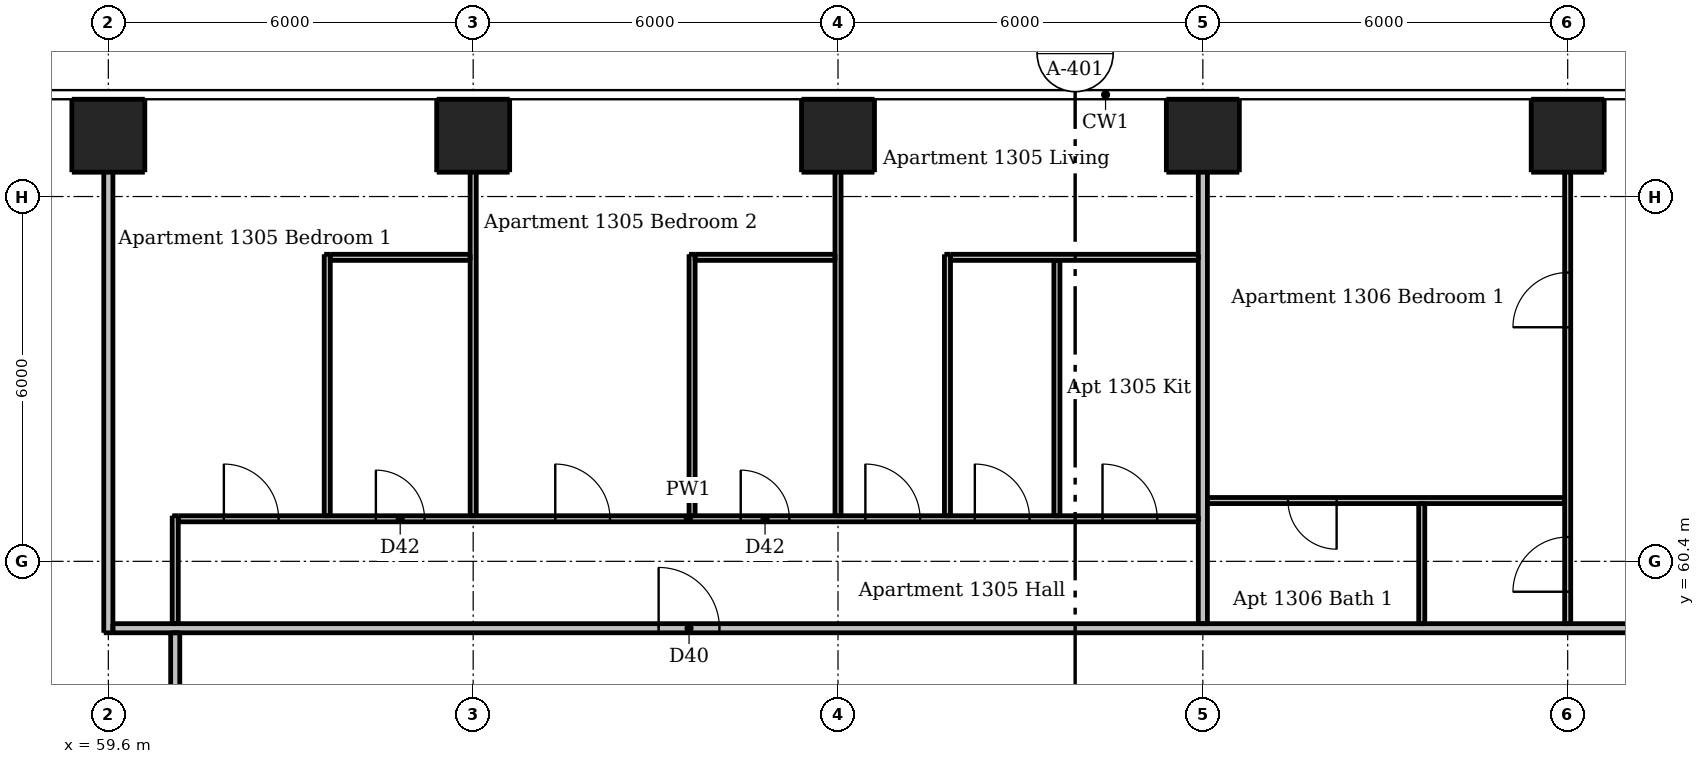
"""IFC4 building model, lengths in metres.
Left out: names, types, materials, properties, quantities, classifications, styles, units other than length and angle.
Written with IfcOpenShell. Run it as: python <this file> out.ifc"""

import sys

from ifc_helpers import new_model, si_unit, direction, frame, frame_2d, origin, origin_2d, place, context, subcontext, project, spatial, rectangle, extrude, element, fill, save


model = new_model("IFC4")
c1 = context("Model", 3, precision=1e-05, world=origin(), true_north=direction((0.0, 1.0)))
c2 = subcontext(c1, "Body", "Model", "MODEL_VIEW")
j1 = project(units=[si_unit("LENGTHUNIT", "METRE"), si_unit("PLANEANGLEUNIT", "RADIAN")], contexts=[c1])
p1 = place(None, origin())
s1 = spatial("IfcSite", under=j1, at=p1, CompositionType="ELEMENT")
p2 = place(p1, origin())
s2 = spatial("IfcBuilding", under=s1, at=p2, CompositionType="ELEMENT")
p3 = place(p2, frame((0.0, 0.0, 49.9)))
s3 = spatial("IfcBuildingStorey", under=s2, at=p3, CompositionType="ELEMENT", Elevation=49.9)
for number, where, z_axis, x_axis in (
    (1, (59.6, 67.4, 0.0), (0.0, 0.0, 1.0), (1.0, 0.0, 0.0)),
    (2, (65.6, 67.4, 0.0), (0.0, 0.0, 1.0), (1.0, 0.0, 0.0)),
    (3, (71.6, 67.4, 0.0), (0.0, 0.0, 1.0), (1.0, 0.0, 0.0)),
    (4, (77.6, 67.4, 0.0), (0.0, 0.0, 1.0), (1.0, 0.0, 0.0)),
    (5, (83.6, 67.4, 0.0), (0.0, 0.0, 1.0), (1.0, 0.0, 0.0)),
):
    element("IfcColumn", number, at=place(p3, frame(where, z_axis=z_axis, x_axis=x_axis)), inside=s3, PredefinedType="COLUMN", context=c2, shape_type="SweptSolid", body=[
        extrude(rectangle(XDim=1.2, YDim=1.2, at=origin_2d()), origin(), (0.0, 0.0, 1.0), 3.05),
    ])
p4 = place(p3, frame((60.7, 59.375, 0.0), z_axis=(0.0, 0.0, 1.0), x_axis=(0.0, 1.0, 0.0)))
e6 = element("IfcWall", 6, at=p4, inside=s3, PredefinedType="PARTITIONING", context=c2, shape_type="SweptSolid", body=[
    extrude(rectangle(XDim=1.775, YDim=0.1, at=frame_2d((0.887, 0.0))), origin(), (0.0, 0.0, 1.0), 3.05),
])
p5 = place(p3, frame((63.2, 61.15, 0.0), z_axis=(0.0, 0.0, 1.0), x_axis=(0.0, 1.0, 0.0)))
e7 = element("IfcWall", 7, at=p5, inside=s3, PredefinedType="PARTITIONING", context=c2, shape_type="SweptSolid", body=[
    extrude(rectangle(XDim=4.3, YDim=0.1, at=frame_2d((2.15, 0.0))), origin(), (0.0, 0.0, 1.0), 3.05),
])
p6 = place(p3, frame((65.6, 61.15, 0.0), z_axis=(0.0, 0.0, 1.0), x_axis=(0.0, 1.0, 0.0)))
e8 = element("IfcWall", 8, at=p6, inside=s3, PredefinedType="PARTITIONING", context=c2, shape_type="SweptSolid", body=[
    extrude(rectangle(XDim=6.85, YDim=0.1, at=frame_2d((3.425, 0.0))), origin(), (0.0, 0.0, 1.0), 2.516),
])
p7 = place(p3, frame((69.2, 61.15, 0.0), z_axis=(0.0, 0.0, 1.0), x_axis=(0.0, 1.0, 0.0)))
e9 = element("IfcWall", 9, at=p7, inside=s3, PredefinedType="PARTITIONING", context=c2, shape_type="SweptSolid", body=[
    extrude(rectangle(XDim=4.3, YDim=0.1, at=frame_2d((2.15, 0.0))), origin(), (0.0, 0.0, 1.0), 3.05),
])
p8 = place(p3, frame((71.6, 61.15, 0.0), z_axis=(0.0, 0.0, 1.0), x_axis=(0.0, 1.0, 0.0)))
e10 = element("IfcWall", 10, at=p8, inside=s3, PredefinedType="PARTITIONING", context=c2, shape_type="SweptSolid", body=[
    extrude(rectangle(XDim=6.85, YDim=0.1, at=frame_2d((3.425, 0.0))), origin(), (0.0, 0.0, 1.0), 2.516),
])
p9 = place(p3, frame((73.4, 61.15, 0.0), z_axis=(0.0, 0.0, 1.0), x_axis=(0.0, 1.0, 0.0)))
e11 = element("IfcWall", 11, at=p9, inside=s3, PredefinedType="PARTITIONING", context=c2, shape_type="SweptSolid", body=[
    extrude(rectangle(XDim=4.3, YDim=0.1, at=frame_2d((2.15, 0.0))), origin(), (0.0, 0.0, 1.0), 3.05),
])
p10 = place(p3, frame((75.2, 61.15, 0.0), z_axis=(0.0, 0.0, 1.0), x_axis=(0.0, 1.0, 0.0)))
e12 = element("IfcWall", 12, at=p10, inside=s3, PredefinedType="PARTITIONING", context=c2, shape_type="SweptSolid", body=[
    extrude(rectangle(XDim=4.2, YDim=0.1, at=frame_2d((2.1, 0.0))), origin(), (0.0, 0.0, 1.0), 3.05),
])
p11 = place(p3, frame((81.2, 59.375, 0.0), z_axis=(0.0, 0.0, 1.0), x_axis=(0.0, 1.0, 0.0)))
e13 = element("IfcWall", 13, at=p11, inside=s3, PredefinedType="PARTITIONING", context=c2, shape_type="SweptSolid", body=[
    extrude(rectangle(XDim=1.975, YDim=0.1, at=frame_2d((0.988, 0.0))), origin(), (0.0, 0.0, 1.0), 3.05),
])
p12 = place(p3, frame((83.6, 59.375, 0.0), z_axis=(0.0, 0.0, 1.0), x_axis=(0.0, 1.0, 0.0)))
e14 = element("IfcWall", 14, at=p12, inside=s3, PredefinedType="PARTITIONING", context=c2, shape_type="SweptSolid", body=[
    extrude(rectangle(XDim=8.625, YDim=0.1, at=frame_2d((4.312, 0.0))), origin(), (0.0, 0.0, 1.0), 2.516),
])
p13 = place(p12, frame((0.525, 0.0, 0.0)))
e15 = element("IfcOpeningElement", 15, at=p13, cuts=e14, PredefinedType="OPENING", context=c2, shape_type="SweptSolid", body=[
    extrude(rectangle(XDim=0.9, YDim=2.1, at=frame_2d((0.45, 1.05))), frame((0.0, 0.06, 0.0), z_axis=(0.0, -1.0, 0.0), x_axis=(1.0, 0.0, 0.0)), (0.0, 0.0, 1.0), 0.12),
])
p14 = place(p12, frame((4.875, 0.0, 0.0)))
e16 = element("IfcOpeningElement", 16, at=p14, cuts=e14, PredefinedType="OPENING", context=c2, shape_type="SweptSolid", body=[
    extrude(rectangle(XDim=0.9, YDim=2.1, at=frame_2d((0.45, 1.05))), frame((0.0, 0.06, 0.0), z_axis=(0.0, -1.0, 0.0), x_axis=(1.0, 0.0, 0.0)), (0.0, 0.0, 1.0), 0.12),
])
for number, where, z_axis, x_axis in (
    (17, (63.25, 65.4, 0.0), (0.0, 0.0, 1.0), (1.0, 0.0, 0.0)),
    (18, (69.25, 65.4, 0.0), (0.0, 0.0, 1.0), (1.0, 0.0, 0.0)),
):
    element("IfcWall", number, at=place(p3, frame(where, z_axis=z_axis, x_axis=x_axis)), inside=s3, PredefinedType="PARTITIONING", context=c2, shape_type="SweptSolid", body=[
        extrude(rectangle(XDim=2.3, YDim=0.1, at=frame_2d((1.15, 0.0))), origin(), (0.0, 0.0, 1.0), 3.05),
    ])
p15 = place(p3, frame((73.45, 65.4, 0.0), z_axis=(0.0, 0.0, 1.0), x_axis=(1.0, 0.0, 0.0)))
e19 = element("IfcWall", 19, at=p15, inside=s3, PredefinedType="PARTITIONING", context=c2, shape_type="SweptSolid", body=[
    extrude(rectangle(XDim=4.075, YDim=0.1, at=frame_2d((2.038, 0.0))), origin(), (0.0, 0.0, 1.0), 3.05),
])
p16 = place(p3, frame((83.55, 61.4, 0.0), z_axis=(0.0, 0.0, 1.0), x_axis=(-1.0, 0.0, 0.0)))
e20 = element("IfcWall", 20, at=p16, inside=s3, PredefinedType="PARTITIONING", context=c2, shape_type="SweptSolid", body=[
    extrude(rectangle(XDim=5.875, YDim=0.1, at=frame_2d((2.938, 0.0))), origin(), (0.0, 0.0, 1.0), 3.05),
])
p17 = place(p16, frame((3.75, 0.0, 0.0)))
e21 = element("IfcOpeningElement", 21, at=p17, cuts=e20, PredefinedType="OPENING", context=c2, shape_type="SweptSolid", body=[
    extrude(rectangle(XDim=0.8, YDim=2.1, at=frame_2d((0.4, 1.05))), frame((0.0, 0.06, 0.0), z_axis=(0.0, -1.0, 0.0), x_axis=(1.0, 0.0, 0.0)), (0.0, 0.0, 1.0), 0.12),
])
p18 = place(p3, frame((60.75, 61.1, 0.0), z_axis=(0.0, 0.0, 1.0), x_axis=(1.0, 0.0, 0.0)))
e22 = element("IfcWall", 22, at=p18, inside=s3, PredefinedType="PARTITIONING", context=c2, shape_type="SweptSolid", body=[
    extrude(rectangle(XDim=16.775, YDim=0.1, at=frame_2d((8.387, 0.0))), origin(), (0.0, 0.0, 1.0), 3.05),
])
p19 = place(p18, frame((11.3, 0.0, 0.0)))
e23 = element("IfcOpeningElement", 23, at=p19, cuts=e22, PredefinedType="OPENING", context=c2, shape_type="SweptSolid", body=[
    extrude(rectangle(XDim=0.9, YDim=2.1, at=frame_2d((0.45, 1.05))), frame((0.0, 0.06, 0.0), z_axis=(0.0, -1.0, 0.0), x_axis=(1.0, 0.0, 0.0)), (0.0, 0.0, 1.0), 0.12),
])
p20 = place(p18, frame((15.2, 0.0, 0.0)))
e24 = element("IfcOpeningElement", 24, at=p20, cuts=e22, PredefinedType="OPENING", context=c2, shape_type="SweptSolid", body=[
    extrude(rectangle(XDim=0.9, YDim=2.1, at=frame_2d((0.45, 1.05))), frame((0.0, 0.06, 0.0), z_axis=(0.0, -1.0, 0.0), x_axis=(1.0, 0.0, 0.0)), (0.0, 0.0, 1.0), 0.12),
])
p21 = place(p18, frame((13.1, 0.0, 0.0)))
e25 = element("IfcOpeningElement", 25, at=p21, cuts=e22, PredefinedType="OPENING", context=c2, shape_type="SweptSolid", body=[
    extrude(rectangle(XDim=0.9, YDim=2.1, at=frame_2d((0.45, 1.05))), frame((0.0, 0.06, 0.0), z_axis=(0.0, -1.0, 0.0), x_axis=(1.0, 0.0, 0.0)), (0.0, 0.0, 1.0), 0.12),
])
p22 = place(p18, frame((0.75, 0.0, 0.0)))
e26 = element("IfcOpeningElement", 26, at=p22, cuts=e22, PredefinedType="OPENING", context=c2, shape_type="SweptSolid", body=[
    extrude(rectangle(XDim=0.9, YDim=2.1, at=frame_2d((0.45, 1.05))), frame((0.0, 0.06, 0.0), z_axis=(0.0, -1.0, 0.0), x_axis=(1.0, 0.0, 0.0)), (0.0, 0.0, 1.0), 0.12),
])
p23 = place(p18, frame((6.2, 0.0, 0.0)))
e27 = element("IfcOpeningElement", 27, at=p23, cuts=e22, PredefinedType="OPENING", context=c2, shape_type="SweptSolid", body=[
    extrude(rectangle(XDim=0.9, YDim=2.1, at=frame_2d((0.45, 1.05))), frame((0.0, 0.06, 0.0), z_axis=(0.0, -1.0, 0.0), x_axis=(1.0, 0.0, 0.0)), (0.0, 0.0, 1.0), 0.12),
])
p24 = place(p18, frame((3.25, 0.0, 0.0)))
e28 = element("IfcOpeningElement", 28, at=p24, cuts=e22, PredefinedType="OPENING", context=c2, shape_type="SweptSolid", body=[
    extrude(rectangle(XDim=0.8, YDim=2.1, at=frame_2d((0.4, 1.05))), frame((0.0, 0.06, 0.0), z_axis=(0.0, -1.0, 0.0), x_axis=(1.0, 0.0, 0.0)), (0.0, 0.0, 1.0), 0.12),
])
p25 = place(p18, frame((9.25, 0.0, 0.0)))
e29 = element("IfcOpeningElement", 29, at=p25, cuts=e22, PredefinedType="OPENING", context=c2, shape_type="SweptSolid", body=[
    extrude(rectangle(XDim=0.8, YDim=2.1, at=frame_2d((0.4, 1.05))), frame((0.0, 0.06, 0.0), z_axis=(0.0, -1.0, 0.0), x_axis=(1.0, 0.0, 0.0)), (0.0, 0.0, 1.0), 0.12),
])
p26 = place(p3, frame((59.6, 59.225, 0.0), z_axis=(0.0, 0.0, 1.0), x_axis=(0.0, 1.0, 0.0)))
e30 = element("IfcWall", 30, at=p26, inside=s3, PredefinedType="PARTITIONING", context=c2, shape_type="SweptSolid", body=[
    extrude(rectangle(XDim=8.775, YDim=0.15, at=frame_2d((4.387, 0.0))), origin(), (0.0, 0.0, 1.0), 2.51),
])
p27 = place(p3, frame((60.7, 30.325, 0.0), z_axis=(0.0, 0.0, 1.0), x_axis=(0.0, 1.0, 0.0)))
e31 = element("IfcWall", 31, at=p27, inside=s3, PredefinedType="PARTITIONING", context=c2, shape_type="SweptSolid", body=[
    extrude(rectangle(XDim=28.9, YDim=0.15, at=frame_2d((14.45, 0.0))), origin(), (0.0, 0.0, 1.0), 3.05),
])
p28 = place(p27, frame((7.375, 0.0, 0.0)))
e32 = element("IfcOpeningElement", 32, at=p28, cuts=e31, PredefinedType="OPENING", context=c2, shape_type="SweptSolid", body=[
    extrude(rectangle(XDim=1.0, YDim=2.1, at=frame_2d((0.5, 1.05))), frame((0.0, 0.085, 0.0), z_axis=(0.0, -1.0, 0.0), x_axis=(1.0, 0.0, 0.0)), (0.0, 0.0, 1.0), 0.17),
])
p29 = place(p27, frame((26.025, 0.0, 0.0)))
e33 = element("IfcOpeningElement", 33, at=p29, cuts=e31, PredefinedType="OPENING", context=c2, shape_type="SweptSolid", body=[
    extrude(rectangle(XDim=1.0, YDim=2.1, at=frame_2d((0.5, 1.05))), frame((0.0, 0.085, 0.0), z_axis=(0.0, -1.0, 0.0), x_axis=(1.0, 0.0, 0.0)), (0.0, 0.0, 1.0), 0.17),
])
p30 = place(p3, frame((77.6, 59.375, 0.0), z_axis=(0.0, 0.0, 1.0), x_axis=(0.0, 1.0, 0.0)))
e34 = element("IfcWall", 34, at=p30, inside=s3, PredefinedType="PARTITIONING", context=c2, shape_type="SweptSolid", body=[
    extrude(rectangle(XDim=8.625, YDim=0.15, at=frame_2d((4.312, 0.0))), origin(), (0.0, 0.0, 1.0), 2.516),
])
p31 = place(p3, frame((59.675, 59.3, 0.0), z_axis=(0.0, 0.0, 1.0), x_axis=(1.0, 0.0, 0.0)))
e35 = element("IfcWall", 35, at=p31, inside=s3, PredefinedType="PARTITIONING", context=c2, shape_type="SweptSolid", body=[
    extrude(rectangle(XDim=28.55, YDim=0.15, at=frame_2d((14.275, 0.0))), origin(), (0.0, 0.0, 1.0), 3.05),
])
p32 = place(p31, frame((8.975, 0.0, 0.0)))
e36 = element("IfcOpeningElement", 36, at=p32, cuts=e35, PredefinedType="OPENING", context=c2, shape_type="SweptSolid", body=[
    extrude(rectangle(XDim=1.0, YDim=2.1, at=frame_2d((0.5, 1.05))), frame((0.0, 0.085, 0.0), z_axis=(0.0, -1.0, 0.0), x_axis=(1.0, 0.0, 0.0)), (0.0, 0.0, 1.0), 0.17),
])
p33 = place(p31, frame((25.775, 0.0, 0.0)))
e37 = element("IfcOpeningElement", 37, at=p33, cuts=e35, PredefinedType="OPENING", context=c2, shape_type="SweptSolid", body=[
    extrude(rectangle(XDim=1.0, YDim=2.1, at=frame_2d((0.5, 1.05))), frame((0.0, 0.085, 0.0), z_axis=(0.0, -1.0, 0.0), x_axis=(1.0, 0.0, 0.0)), (0.0, 0.0, 1.0), 0.17),
])
p34 = place(p32, origin())
e38 = element("IfcDoor", 38, at=p34, inside=s3, OperationType="SINGLE_SWING_LEFT", PredefinedType="DOOR", context=c2, shape_type="SweptSolid", body=[
    extrude(rectangle(XDim=1.0, YDim=2.1, at=frame_2d((0.5, 1.05))), frame((0.0, 0.025, 0.0), z_axis=(0.0, -1.0, 0.0), x_axis=(1.0, 0.0, 0.0)), (0.0, 0.0, 1.0), 0.05),
])
fill(e36, e38)
p35 = place(p19, origin())
e39 = element("IfcDoor", 39, at=p35, inside=s3, OperationType="SINGLE_SWING_LEFT", PredefinedType="DOOR", context=c2, shape_type="SweptSolid", body=[
    extrude(rectangle(XDim=0.9, YDim=2.1, at=frame_2d((0.45, 1.05))), frame((0.0, 0.025, 0.0), z_axis=(0.0, -1.0, 0.0), x_axis=(1.0, 0.0, 0.0)), (0.0, 0.0, 1.0), 0.05),
])
fill(e23, e39)
p36 = place(p20, origin())
e40 = element("IfcDoor", 40, at=p36, inside=s3, OperationType="SINGLE_SWING_LEFT", PredefinedType="DOOR", context=c2, shape_type="SweptSolid", body=[
    extrude(rectangle(XDim=0.9, YDim=2.1, at=frame_2d((0.45, 1.05))), frame((0.0, 0.025, 0.0), z_axis=(0.0, -1.0, 0.0), x_axis=(1.0, 0.0, 0.0)), (0.0, 0.0, 1.0), 0.05),
])
fill(e24, e40)
p37 = place(p21, origin())
e41 = element("IfcDoor", 41, at=p37, inside=s3, OperationType="SINGLE_SWING_LEFT", PredefinedType="DOOR", context=c2, shape_type="SweptSolid", body=[
    extrude(rectangle(XDim=0.9, YDim=2.1, at=frame_2d((0.45, 1.05))), frame((0.0, 0.025, 0.0), z_axis=(0.0, -1.0, 0.0), x_axis=(1.0, 0.0, 0.0)), (0.0, 0.0, 1.0), 0.05),
])
fill(e25, e41)
p38 = place(p22, origin())
e42 = element("IfcDoor", 42, at=p38, inside=s3, OperationType="SINGLE_SWING_LEFT", PredefinedType="DOOR", context=c2, shape_type="SweptSolid", body=[
    extrude(rectangle(XDim=0.9, YDim=2.1, at=frame_2d((0.45, 1.05))), frame((0.0, 0.025, 0.0), z_axis=(0.0, -1.0, 0.0), x_axis=(1.0, 0.0, 0.0)), (0.0, 0.0, 1.0), 0.05),
])
fill(e26, e42)
p39 = place(p23, origin())
e43 = element("IfcDoor", 43, at=p39, inside=s3, OperationType="SINGLE_SWING_LEFT", PredefinedType="DOOR", context=c2, shape_type="SweptSolid", body=[
    extrude(rectangle(XDim=0.9, YDim=2.1, at=frame_2d((0.45, 1.05))), frame((0.0, 0.025, 0.0), z_axis=(0.0, -1.0, 0.0), x_axis=(1.0, 0.0, 0.0)), (0.0, 0.0, 1.0), 0.05),
])
fill(e27, e43)
p40 = place(p24, origin())
e44 = element("IfcDoor", 44, at=p40, inside=s3, OperationType="SINGLE_SWING_LEFT", PredefinedType="DOOR", context=c2, shape_type="SweptSolid", body=[
    extrude(rectangle(XDim=0.8, YDim=2.1, at=frame_2d((0.4, 1.05))), frame((0.0, 0.025, 0.0), z_axis=(0.0, -1.0, 0.0), x_axis=(1.0, 0.0, 0.0)), (0.0, 0.0, 1.0), 0.05),
])
fill(e28, e44)
p41 = place(p25, origin())
e45 = element("IfcDoor", 45, at=p41, inside=s3, OperationType="SINGLE_SWING_LEFT", PredefinedType="DOOR", context=c2, shape_type="SweptSolid", body=[
    extrude(rectangle(XDim=0.8, YDim=2.1, at=frame_2d((0.4, 1.05))), frame((0.0, 0.025, 0.0), z_axis=(0.0, -1.0, 0.0), x_axis=(1.0, 0.0, 0.0)), (0.0, 0.0, 1.0), 0.05),
])
fill(e29, e45)
p42 = place(p13, origin())
e46 = element("IfcDoor", 46, at=p42, inside=s3, OperationType="SINGLE_SWING_LEFT", PredefinedType="DOOR", context=c2, shape_type="SweptSolid", body=[
    extrude(rectangle(XDim=0.9, YDim=2.1, at=frame_2d((0.45, 1.05))), frame((0.0, 0.025, 0.0), z_axis=(0.0, -1.0, 0.0), x_axis=(1.0, 0.0, 0.0)), (0.0, 0.0, 1.0), 0.05),
])
fill(e15, e46)
p43 = place(p14, origin())
e47 = element("IfcDoor", 47, at=p43, inside=s3, OperationType="SINGLE_SWING_LEFT", PredefinedType="DOOR", context=c2, shape_type="SweptSolid", body=[
    extrude(rectangle(XDim=0.9, YDim=2.1, at=frame_2d((0.45, 1.05))), frame((0.0, 0.025, 0.0), z_axis=(0.0, -1.0, 0.0), x_axis=(1.0, 0.0, 0.0)), (0.0, 0.0, 1.0), 0.05),
])
fill(e16, e47)
p44 = place(p17, origin())
e48 = element("IfcDoor", 48, at=p44, inside=s3, OperationType="SINGLE_SWING_LEFT", PredefinedType="DOOR", context=c2, shape_type="SweptSolid", body=[
    extrude(rectangle(XDim=0.8, YDim=2.1, at=frame_2d((0.4, 1.05))), frame((0.0, 0.025, 0.0), z_axis=(0.0, -1.0, 0.0), x_axis=(1.0, 0.0, 0.0)), (0.0, 0.0, 1.0), 0.05),
])
fill(e21, e48)
save(model, sys.argv[1])
